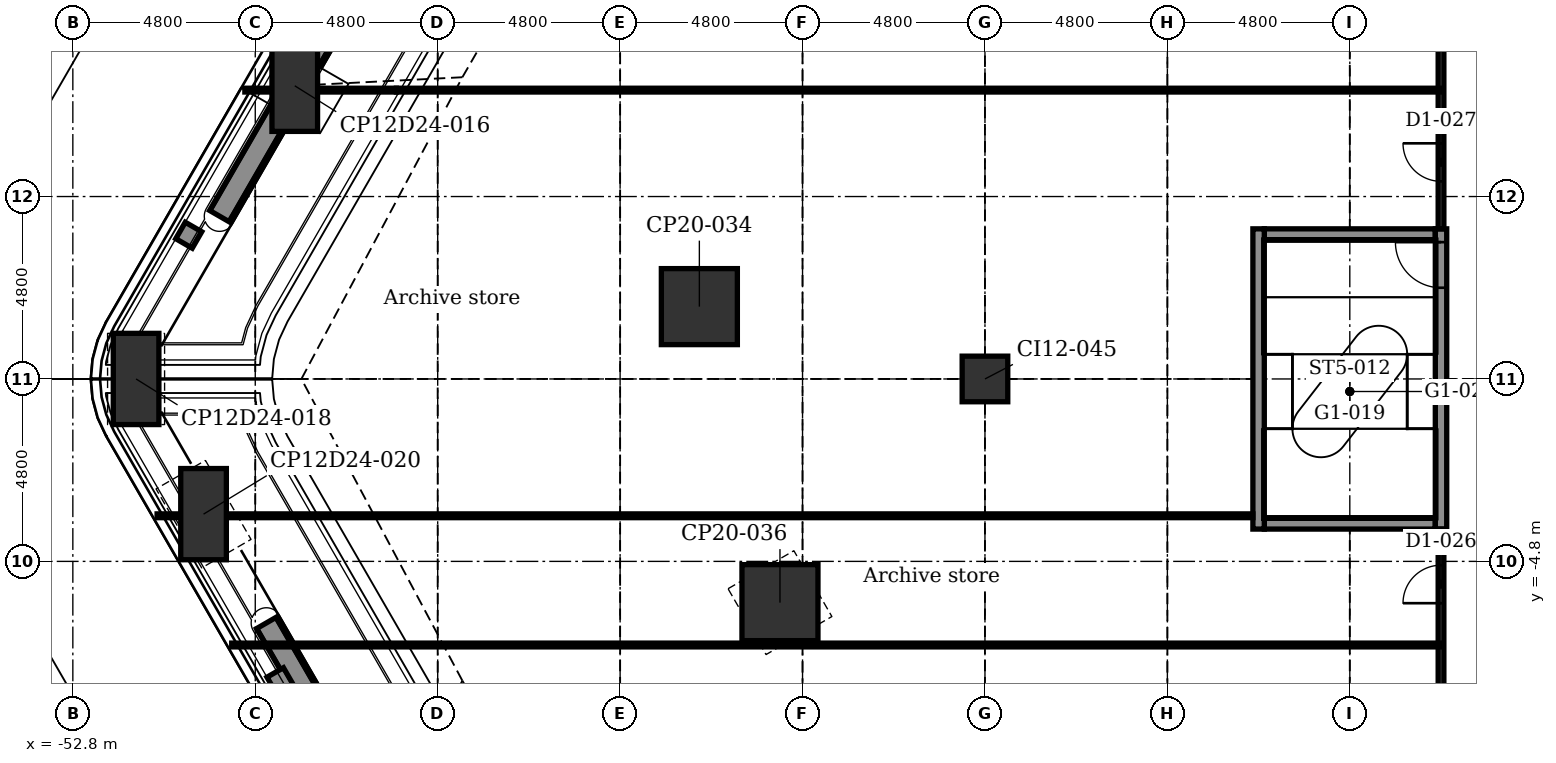
"""IFC4 building model, lengths in metres.
Left out: names, types, materials, properties, quantities, classifications, styles, units other than length and angle.
Written with IfcOpenShell. Run it as: python <this file> out.ifc"""

import sys

from ifc_helpers import new_model, si_unit, direction, frame, frame_2d, origin, origin_2d, place, context, subcontext, project, spatial, rectangle, extrude, element, fill, save


model = new_model("IFC4")
c1 = context("Model", 3, precision=1e-05, world=origin(), true_north=direction((0.0, 1.0)))
c2 = subcontext(c1, "Body", "Model", "MODEL_VIEW")
j1 = project(units=[si_unit("LENGTHUNIT", "METRE"), si_unit("PLANEANGLEUNIT", "RADIAN")], contexts=[c1])
p1 = place(None, origin())
s1 = spatial("IfcSite", under=j1, at=p1, CompositionType="ELEMENT")
p2 = place(p1, origin())
s2 = spatial("IfcBuilding", under=s1, at=p2, CompositionType="ELEMENT")
p3 = place(p2, frame((0.0, 0.0, 7.0)))
s3 = spatial("IfcBuildingStorey", under=s2, at=p3, CompositionType="ELEMENT", Elevation=7.0)
for number, where, z_axis, x_axis in (
    (1, (-49.361, -3.557, -0.3), (0.0, 0.0, 1.0), (0.866, 0.5, 0.0)),
    (2, (-51.136, 0.0, -0.3), (0.0, 0.0, 1.0), (1.0, 0.0, 0.0)),
    (3, (-46.961, 7.714, -0.3), (0.0, 0.0, 1.0), (0.5, 0.866, 0.0)),
):
    element("IfcColumn", number, at=place(p3, frame(where, z_axis=z_axis, x_axis=x_axis)), inside=s3, PredefinedType="COLUMN", context=c2, shape_type="SweptSolid", body=[
        extrude(rectangle(XDim=1.2, YDim=2.4, at=origin_2d()), origin(), (0.0, 0.0, 1.0), 5.4),
    ])
for number, where, z_axis, x_axis in (
    (4, (-34.194, -5.885, -0.3), (0.0, 0.0, 1.0), (0.866, 0.5, 0.0)),
    (5, (-36.315, 1.904, -0.3), (0.0, 0.0, 1.0), (1.0, 0.0, 0.0)),
):
    element("IfcColumn", number, at=place(p3, frame(where, z_axis=z_axis, x_axis=x_axis)), inside=s3, PredefinedType="COLUMN", context=c2, shape_type="SweptSolid", body=[
        extrude(rectangle(XDim=2.0, YDim=2.0, at=origin_2d()), origin(), (0.0, 0.0, 1.0), 5.4),
    ])
p4 = place(p3, frame((-28.8, 0.0, -0.3), z_axis=(0.0, 0.0, 1.0), x_axis=(1.0, 0.0, 0.0)))
e6 = element("IfcColumn", 6, at=p4, inside=s3, PredefinedType="COLUMN", context=c2, shape_type="SweptSolid", body=[
    extrude(rectangle(XDim=1.2, YDim=1.2, at=origin_2d()), origin(), (0.0, 0.0, 1.0), 5.4),
])
for number, where, z_axis, x_axis in (
    (7, (-21.45, -3.8, -0.3), (0.0, 0.0, 1.0), (1.0, 0.0, 0.0)),
    (8, (-21.45, 3.8, -0.3), (0.0, 0.0, 1.0), (1.0, 0.0, 0.0)),
):
    element("IfcWall", number, at=place(p3, frame(where, z_axis=z_axis, x_axis=x_axis)), inside=s3, PredefinedType="STANDARD", context=c2, shape_type="SweptSolid", body=[
        extrude(rectangle(XDim=4.5, YDim=0.3, at=frame_2d((2.25, 0.0))), origin(), (0.0, 0.0, 1.0), 5.4),
    ])
p5 = place(p3, frame((-21.6, -3.95, -0.3), z_axis=(0.0, 0.0, 1.0), x_axis=(0.0, 1.0, 0.0)))
e9 = element("IfcWall", 9, at=p5, inside=s3, PredefinedType="STANDARD", context=c2, shape_type="SweptSolid", body=[
    extrude(rectangle(XDim=7.9, YDim=0.3, at=frame_2d((3.95, 0.0))), origin(), (0.0, 0.0, 1.0), 5.4),
])
p6 = place(p3, frame((-16.8, -3.95, -0.3), z_axis=(0.0, 0.0, 1.0), x_axis=(0.0, 1.0, 0.0)))
e10 = element("IfcWall", 10, at=p6, inside=s3, PredefinedType="STANDARD", context=c2, shape_type="SweptSolid", body=[
    extrude(rectangle(XDim=7.9, YDim=0.3, at=frame_2d((3.95, 0.0))), origin(), (0.0, 0.0, 1.0), 5.4),
])
p7 = place(p6, frame((6.35, 0.0, 0.3)))
e11 = element("IfcOpeningElement", 11, at=p7, cuts=e10, PredefinedType="OPENING", context=c2, shape_type="SweptSolid", body=[
    extrude(rectangle(XDim=1.2, YDim=2.1, at=frame_2d((0.6, 1.05))), frame((0.0, 0.16, 0.0), z_axis=(0.0, -1.0, 0.0), x_axis=(1.0, 0.0, 0.0)), (0.0, 0.0, 1.0), 0.32),
])
for number, where, z_axis, x_axis in (
    (12, (-44.708, -11.616, 5.4), (0.0, 0.0, 1.0), (-0.5, 0.866, 0.0)),
    (13, (-48.941, 4.284, 5.4), (0.0, 0.0, 1.0), (0.5, 0.866, 0.0)),
):
    element("IfcWall", number, at=place(p3, frame(where, z_axis=z_axis, x_axis=x_axis)), inside=s3, PredefinedType="USERDEFINED", context=c2, shape_type="SweptSolid", body=[
        extrude(rectangle(XDim=6.0, YDim=0.6, at=frame_2d((3.0, 0.0))), origin(), (0.0, 0.0, 1.0), 0.7),
    ])
for number, where, z_axis, x_axis in (
    (14, (-47.225, -8.156, 0.0), (0.0, 0.0, 1.0), (-0.5, 0.866, 0.0)),
    (15, (-49.875, 3.565, 0.0), (0.0, 0.0, 1.0), (0.5, 0.866, 0.0)),
):
    element("IfcWall", number, at=place(p3, frame(where, z_axis=z_axis, x_axis=x_axis)), inside=s3, PredefinedType="SOLIDWALL", context=c2, shape_type="SweptSolid", body=[
        extrude(rectangle(XDim=0.5, YDim=0.5, at=frame_2d((0.25, 0.0))), origin(), (0.0, 0.0, 1.0), 4.8),
    ])
p8 = place(p3, frame((-16.8, -13.6, 0.0), z_axis=(0.0, 0.0, 1.0), x_axis=(0.0, 1.0, 0.0)))
e16 = element("IfcWall", 16, at=p8, inside=s3, PredefinedType="PARTITIONING", context=c2, shape_type="SweptSolid", body=[
    extrude(rectangle(XDim=9.65, YDim=0.15, at=frame_2d((4.825, 0.0))), origin(), (0.0, 0.0, 1.0), 5.1),
])
p9 = place(p8, frame((1.3, 0.0, 0.0)))
e17 = element("IfcOpeningElement", 17, at=p9, cuts=e16, PredefinedType="OPENING", context=c2, shape_type="SweptSolid", body=[
    extrude(rectangle(XDim=1.0, YDim=2.1, at=frame_2d((0.5, 1.05))), frame((0.0, 0.085, 0.0), z_axis=(0.0, -1.0, 0.0), x_axis=(1.0, 0.0, 0.0)), (0.0, 0.0, 1.0), 0.17),
])
p10 = place(p8, frame((7.7, 0.0, 0.0)))
e18 = element("IfcOpeningElement", 18, at=p10, cuts=e16, PredefinedType="OPENING", context=c2, shape_type="SweptSolid", body=[
    extrude(rectangle(XDim=1.0, YDim=2.1, at=frame_2d((0.5, 1.05))), frame((0.0, 0.085, 0.0), z_axis=(0.0, -1.0, 0.0), x_axis=(1.0, 0.0, 0.0)), (0.0, 0.0, 1.0), 0.17),
])
p11 = place(p3, frame((-16.8, 3.95, 0.0), z_axis=(0.0, 0.0, 1.0), x_axis=(0.0, 1.0, 0.0)))
e19 = element("IfcWall", 19, at=p11, inside=s3, PredefinedType="PARTITIONING", context=c2, shape_type="SweptSolid", body=[
    extrude(rectangle(XDim=10.85, YDim=0.15, at=frame_2d((5.425, 0.0))), origin(), (0.0, 0.0, 1.0), 5.1),
])
p12 = place(p11, frame((1.25, 0.0, 0.0)))
e20 = element("IfcOpeningElement", 20, at=p12, cuts=e19, PredefinedType="OPENING", context=c2, shape_type="SweptSolid", body=[
    extrude(rectangle(XDim=1.0, YDim=2.1, at=frame_2d((0.5, 1.05))), frame((0.0, 0.085, 0.0), z_axis=(0.0, -1.0, 0.0), x_axis=(1.0, 0.0, 0.0)), (0.0, 0.0, 1.0), 0.17),
])
p13 = place(p11, frame((7.95, 0.0, 0.0)))
e21 = element("IfcOpeningElement", 21, at=p13, cuts=e19, PredefinedType="OPENING", context=c2, shape_type="SweptSolid", body=[
    extrude(rectangle(XDim=1.0, YDim=2.1, at=frame_2d((0.5, 1.05))), frame((0.0, 0.085, 0.0), z_axis=(0.0, -1.0, 0.0), x_axis=(1.0, 0.0, 0.0)), (0.0, 0.0, 1.0), 0.17),
])
p14 = place(p3, frame((-48.62, -7.0, 0.0), z_axis=(0.0, 0.0, 1.0), x_axis=(1.0, 0.0, 0.0)))
e22 = element("IfcWall", 22, at=p14, inside=s3, PredefinedType="PARTITIONING", context=c2, shape_type="SweptSolid", body=[
    extrude(rectangle(XDim=31.82, YDim=0.1, at=frame_2d((15.91, 0.0))), origin(), (0.0, 0.0, 1.0), 5.1),
])
p15 = place(p3, frame((-50.583, -3.6, 0.0), z_axis=(0.0, 0.0, 1.0), x_axis=(1.0, 0.0, 0.0)))
e23 = element("IfcWall", 23, at=p15, inside=s3, PredefinedType="PARTITIONING", context=c2, shape_type="SweptSolid", body=[
    extrude(rectangle(XDim=28.833, YDim=0.1, at=frame_2d((14.417, 0.0))), origin(), (0.0, 0.0, 1.0), 5.1),
])
p16 = place(p3, frame((-44.286, 7.6, 0.0), z_axis=(0.0, 0.0, 1.0), x_axis=(1.0, 0.0, 0.0)))
e24 = element("IfcWall", 24, at=p16, inside=s3, PredefinedType="PARTITIONING", context=c2, shape_type="SweptSolid", body=[
    extrude(rectangle(XDim=27.486, YDim=0.1, at=frame_2d((13.743, 0.0))), origin(), (0.0, 0.0, 1.0), 5.1),
])
p17 = place(p3, frame((-48.274, 7.6, 0.0), z_axis=(0.0, 0.0, 1.0), x_axis=(1.0, 0.0, 0.0)))
e25 = element("IfcWall", 25, at=p17, inside=s3, PredefinedType="PARTITIONING", context=c2, shape_type="SweptSolid", body=[
    extrude(rectangle(XDim=1.907, YDim=0.1, at=frame_2d((0.954, 0.0))), origin(), (0.0, 0.0, 1.0), 5.1),
])
p18 = place(p3, frame((-46.367, 7.6, 0.0), z_axis=(0.0, 0.0, 1.0), x_axis=(1.0, 0.0, 0.0)))
e26 = element("IfcWall", 26, at=p18, inside=s3, PredefinedType="PARTITIONING", context=c2, shape_type="SweptSolid", body=[
    extrude(rectangle(XDim=2.08, YDim=0.1, at=frame_2d((1.04, 0.0))), origin(), (0.0, 0.0, 1.0), 3.9),
])
p19 = place(p10, origin())
e27 = element("IfcDoor", 27, at=p19, inside=s3, OperationType="SINGLE_SWING_LEFT", PredefinedType="DOOR", context=c2, shape_type="SweptSolid", body=[
    extrude(rectangle(XDim=1.0, YDim=2.1, at=frame_2d((0.5, 1.05))), frame((0.0, 0.025, 0.0), z_axis=(0.0, -1.0, 0.0), x_axis=(1.0, 0.0, 0.0)), (0.0, 0.0, 1.0), 0.05),
])
fill(e18, e27)
p20 = place(p12, origin())
e28 = element("IfcDoor", 28, at=p20, inside=s3, OperationType="SINGLE_SWING_RIGHT", PredefinedType="DOOR", context=c2, shape_type="SweptSolid", body=[
    extrude(rectangle(XDim=1.0, YDim=2.1, at=frame_2d((0.5, 1.05))), frame((0.0, 0.025, 0.0), z_axis=(0.0, -1.0, 0.0), x_axis=(1.0, 0.0, 0.0)), (0.0, 0.0, 1.0), 0.05),
])
fill(e20, e28)
p21 = place(p7, origin())
e29 = element("IfcDoor", 29, at=p21, inside=s3, OperationType="SINGLE_SWING_RIGHT", PredefinedType="DOOR", context=c2, shape_type="SweptSolid", body=[
    extrude(rectangle(XDim=1.2, YDim=2.1, at=frame_2d((0.6, 1.05))), frame((0.0, 0.025, 0.0), z_axis=(0.0, -1.0, 0.0), x_axis=(1.0, 0.0, 0.0)), (0.0, 0.0, 1.0), 0.05),
])
fill(e11, e29)
save(model, sys.argv[1])
